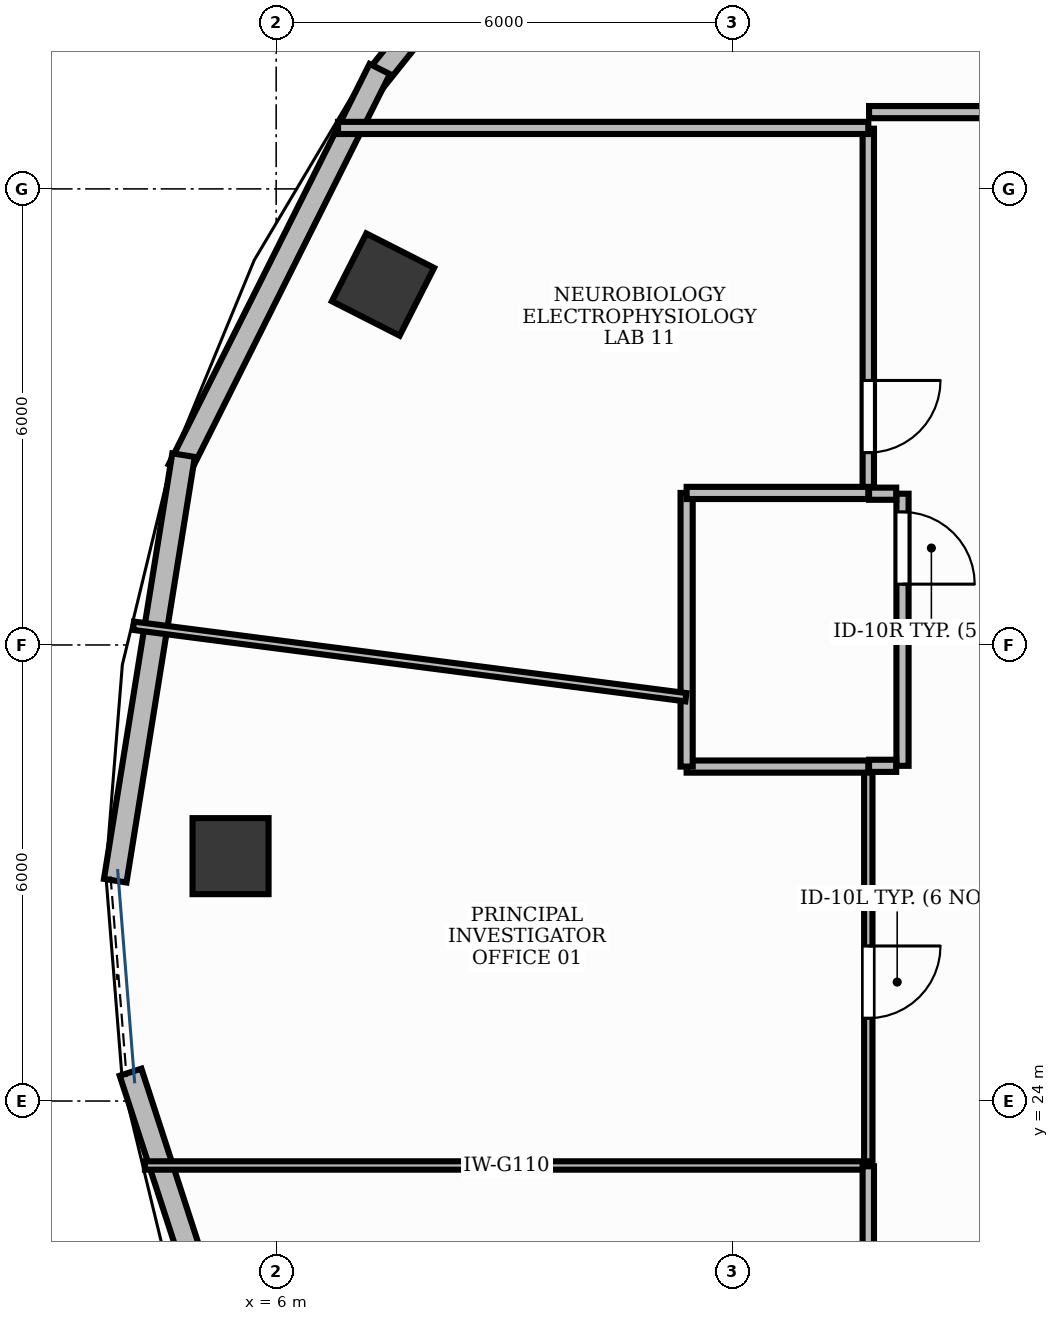
"""IFC4 building model, lengths in metres.
Left out: names, types, materials, properties, quantities, classifications, styles, units other than length and angle.
Written with IfcOpenShell. Run it as: python <this file> out.ifc"""

import sys

from ifc_helpers import new_model, si_unit, direction, frame, frame_2d, origin, origin_2d, place, context, subcontext, project, spatial, rectangle, extrude, element, fill, save


model = new_model("IFC4")
c1 = context("Model", 3, precision=1e-05, world=origin(), true_north=direction((0.0, 1.0)))
c2 = subcontext(c1, "Body", "Model", "MODEL_VIEW")
j1 = project(units=[si_unit("LENGTHUNIT", "METRE"), si_unit("PLANEANGLEUNIT", "RADIAN")], contexts=[c1])
p1 = place(None, origin())
s1 = spatial("IfcSite", under=j1, at=p1, CompositionType="ELEMENT")
p2 = place(p1, origin())
s2 = spatial("IfcBuilding", under=s1, at=p2, CompositionType="ELEMENT")
p3 = place(p2, frame((0.0, 0.0, 218.4)))
s3 = spatial("IfcBuildingStorey", under=s2, at=p3, CompositionType="ELEMENT", Elevation=218.4)
for number, where, z_axis, x_axis in (
    (1, (7.405, 34.741, -0.0), (0.0, 0.0, 1.0), (0.453, 0.891, 0.0)),
    (2, (5.4, 27.222, -0.0), (0.0, 0.0, 1.0), (0.0, 1.0, 0.0)),
):
    element("IfcColumn", number, at=place(p3, frame(where, z_axis=z_axis, x_axis=x_axis)), inside=s3, PredefinedType="COLUMN", context=c2, shape_type="SweptSolid", body=[
        extrude(rectangle(XDim=1.0, YDim=1.0, at=origin_2d()), origin(), (0.0, 0.0, 1.0), 3.901),
    ])
p4 = place(p3, frame((9.244, 39.868, 0.0), z_axis=(0.0, 0.0, 1.0), x_axis=(-0.624095877763, -0.781347768512, 0.0)))
e3 = element("IfcWall", 3, at=p4, inside=s3, PredefinedType="STANDARD", context=c2, shape_type="SweptSolid", body=[
    extrude(rectangle(XDim=3.132, YDim=0.3, at=frame_2d((1.566, 0.0))), origin(), (0.0, 0.0, 1.0), 3.9),
])
p5 = place(p4, frame((0.816, 0.0, 0.95)))
e4 = element("IfcOpeningElement", 4, at=p5, cuts=e3, PredefinedType="OPENING", context=c2, shape_type="SweptSolid", body=[
    extrude(rectangle(XDim=1.5, YDim=1.8, at=frame_2d((0.75, 0.9))), frame((0.0, 0.165, 0.0), z_axis=(0.0, -1.0, 0.0), x_axis=(1.0, 0.0, 0.0)), (0.0, 0.0, 1.0), 0.33),
])
p6 = place(p3, frame((7.363, 37.577, 0.0), z_axis=(0.0, 0.0, 1.0), x_axis=(-0.448240215972, -0.893913143871, 0.0)))
e5 = element("IfcWall", 5, at=p6, inside=s3, PredefinedType="STANDARD", context=c2, shape_type="SweptSolid", body=[
    extrude(rectangle(XDim=5.896, YDim=0.3, at=frame_2d((2.948, 0.0))), origin(), (0.0, 0.0, 1.0), 3.47),
])
p7 = place(p3, frame((4.782, 32.497, 0.0), z_axis=(0.0, 0.0, 1.0), x_axis=(-0.158573166105, -0.987347229191, 0.0)))
e6 = element("IfcWall", 6, at=p7, inside=s3, PredefinedType="STANDARD", context=c2, shape_type="SweptSolid", body=[
    extrude(rectangle(XDim=5.67, YDim=0.3, at=frame_2d((2.835, 0.0))), origin(), (0.0, 0.0, 1.0), 3.47),
])
p8 = place(p3, frame((4.084, 24.379, 0.0), z_axis=(0.0, 0.0, 1.0), x_axis=(0.309937285623, -0.95075700312, 0.0)))
e7 = element("IfcWall", 7, at=p8, inside=s3, PredefinedType="STANDARD", context=c2, shape_type="SweptSolid", body=[
    extrude(rectangle(XDim=5.758, YDim=0.3, at=frame_2d((2.879, 0.0))), origin(), (0.0, 0.0, 1.0), 3.9),
])
p9 = place(p3, frame((14.24, 31.99, 0.0), z_axis=(0.0, 0.0, 1.0), x_axis=(0.0, -1.0, 0.0)))
e8 = element("IfcWall", 8, at=p9, inside=s3, PredefinedType="PARTITIONING", context=c2, shape_type="SweptSolid", body=[
    extrude(rectangle(XDim=3.58, YDim=0.16, at=frame_2d((1.79, 0.0))), origin(), (0.0, 0.0, 1.0), 2.91),
])
p10 = place(p9, frame((0.24, 0.0, 0.0)))
e9 = element("IfcOpeningElement", 9, at=p10, cuts=e8, PredefinedType="OPENING", context=c2, shape_type="SweptSolid", body=[
    extrude(rectangle(XDim=0.95, YDim=2.15, at=frame_2d((0.475, 1.075))), frame((0.0, 0.095, 0.0), z_axis=(0.0, -1.0, 0.0), x_axis=(1.0, 0.0, 0.0)), (0.0, 0.0, 1.0), 0.19),
])
p11 = place(p3, frame((13.79, 28.39, 0.0), z_axis=(0.0, 0.0, 1.0), x_axis=(0.0, -1.0, 0.0)))
e10 = element("IfcWall", 10, at=p11, inside=s3, PredefinedType="MOVABLE", context=c2, shape_type="SweptSolid", body=[
    extrude(rectangle(XDim=5.238, YDim=0.11, at=frame_2d((2.619, 0.0))), origin(), (0.0, 0.0, 1.0), 2.91),
])
p12 = place(p11, frame((2.35, 0.0, 0.0)))
e11 = element("IfcOpeningElement", 11, at=p12, cuts=e10, PredefinedType="OPENING", context=c2, shape_type="SweptSolid", body=[
    extrude(rectangle(XDim=0.95, YDim=2.15, at=frame_2d((0.475, 1.075))), frame((0.0, 0.07, 0.0), z_axis=(0.0, -1.0, 0.0), x_axis=(1.0, 0.0, 0.0)), (0.0, 0.0, 1.0), 0.14),
])
p13 = place(p3, frame((13.79, 36.792, 0.0), z_axis=(0.0, 0.0, 1.0), x_axis=(0.0, -1.0, 0.0)))
e12 = element("IfcWall", 12, at=p13, inside=s3, PredefinedType="PARTITIONING", context=c2, shape_type="SweptSolid", body=[
    extrude(rectangle(XDim=4.782, YDim=0.15, at=frame_2d((2.391, 0.0))), origin(), (0.0, 0.0, 1.0), 2.91),
])
p14 = place(p13, frame((3.312, 0.0, 0.0)))
e13 = element("IfcOpeningElement", 13, at=p14, cuts=e12, PredefinedType="OPENING", context=c2, shape_type="SweptSolid", body=[
    extrude(rectangle(XDim=0.95, YDim=2.15, at=frame_2d((0.475, 1.075))), frame((0.0, 0.09, 0.0), z_axis=(0.0, -1.0, 0.0), x_axis=(1.0, 0.0, 0.0)), (0.0, 0.0, 1.0), 0.18),
])
for number, where, z_axis, x_axis in (
    (14, (13.8, 31.99, 0.0), (0.0, 0.0, 1.0), (1.0, 0.0, 0.0)),
    (15, (14.157, 28.41, 0.0), (0.0, 0.0, 1.0), (-1.0, 0.0, 0.0)),
):
    element("IfcWall", number, at=place(p3, frame(where, z_axis=z_axis, x_axis=x_axis)), inside=s3, PredefinedType="PARTITIONING", context=c2, shape_type="SweptSolid", body=[
        extrude(rectangle(XDim=0.357, YDim=0.16, at=frame_2d((0.178, 0.0))), origin(), (0.0, 0.0, 1.0), 2.91),
    ])
p15 = place(p3, frame((13.79, 28.4, 0.0), z_axis=(0.0, 0.0, 1.0), x_axis=(-1.0, 0.0, 0.0)))
e16 = element("IfcWall", 16, at=p15, inside=s3, PredefinedType="PARTITIONING", context=c2, shape_type="SweptSolid", body=[
    extrude(rectangle(XDim=2.39, YDim=0.16, at=frame_2d((1.195, 0.0))), origin(), (0.0, 0.0, 1.0), 2.91),
])
p16 = place(p3, frame((11.4, 28.4, 0.0), z_axis=(0.0, 0.0, 1.0), x_axis=(0.0, 1.0, 0.0)))
e17 = element("IfcWall", 17, at=p16, inside=s3, PredefinedType="PARTITIONING", context=c2, shape_type="SweptSolid", body=[
    extrude(rectangle(XDim=3.6, YDim=0.16, at=frame_2d((1.8, 0.0))), origin(), (0.0, 0.0, 1.0), 2.91),
])
p17 = place(p3, frame((11.4, 32.0, 0.0), z_axis=(0.0, 0.0, 1.0), x_axis=(1.0, 0.0, 0.0)))
e18 = element("IfcWall", 18, at=p17, inside=s3, PredefinedType="PARTITIONING", context=c2, shape_type="SweptSolid", body=[
    extrude(rectangle(XDim=2.39, YDim=0.16, at=frame_2d((1.195, 0.0))), origin(), (0.0, 0.0, 1.0), 2.91),
])
p18 = place(p3, frame((4.123, 30.253, 0.0), z_axis=(0.0, 0.0, 1.0), x_axis=(0.991734568624, -0.128306451111, 0.0)))
e19 = element("IfcWall", 19, at=p18, inside=s3, PredefinedType="MOVABLE", context=c2, shape_type="SweptSolid", body=[
    extrude(rectangle(XDim=7.328, YDim=0.11, at=frame_2d((3.664, 0.0))), origin(), (0.0, 0.0, 1.0), 2.91),
])
p19 = place(p3, frame((13.79, 23.152, 0.0), z_axis=(0.0, 0.0, 1.0), x_axis=(-1.0, 0.0, 0.0)))
e20 = element("IfcWall", 20, at=p19, inside=s3, PredefinedType="MOVABLE", context=c2, shape_type="SweptSolid", body=[
    extrude(rectangle(XDim=9.517, YDim=0.11, at=frame_2d((4.758, 0.0))), origin(), (0.0, 0.0, 1.0), 2.91),
])
p20 = place(p3, frame((13.79, 23.142, 0.0), z_axis=(0.0, 0.0, 1.0), x_axis=(0.0, -1.0, 0.0)))
e21 = element("IfcWall", 21, at=p20, inside=s3, PredefinedType="PARTITIONING", context=c2, shape_type="SweptSolid", body=[
    extrude(rectangle(XDim=10.046, YDim=0.15, at=frame_2d((5.023, 0.0))), origin(), (0.0, 0.0, 1.0), 2.91),
])
p21 = place(p3, frame((17.6, 37.01, 0.0), z_axis=(0.0, 0.0, 1.0), x_axis=(-1.0, 0.0, 0.0)))
e22 = element("IfcWall", 22, at=p21, inside=s3, PredefinedType="PARTITIONING", context=c2, shape_type="SweptSolid", body=[
    extrude(rectangle(XDim=3.8, YDim=0.16, at=frame_2d((1.9, 0.0))), origin(), (0.0, 0.0, 1.0), 2.91),
])
p22 = place(p3, frame((13.79, 36.802, 0.0), z_axis=(0.0, 0.0, 1.0), x_axis=(-1.0, 0.0, 0.0)))
e23 = element("IfcWall", 23, at=p22, inside=s3, PredefinedType="PARTITIONING", context=c2, shape_type="SweptSolid", body=[
    extrude(rectangle(XDim=6.976, YDim=0.16, at=frame_2d((3.488, 0.0))), origin(), (0.0, 0.0, 1.0), 2.91),
])
p23 = place(p10, origin())
e24 = element("IfcDoor", 24, at=p23, inside=s3, OperationType="SINGLE_SWING_RIGHT", PredefinedType="DOOR", context=c2, shape_type="SweptSolid", body=[
    extrude(rectangle(XDim=0.95, YDim=2.15, at=frame_2d((0.475, 1.075))), frame((0.0, 0.025, 0.0), z_axis=(0.0, -1.0, 0.0), x_axis=(1.0, 0.0, 0.0)), (0.0, 0.0, 1.0), 0.05),
])
fill(e9, e24)
p24 = place(p12, origin())
e25 = element("IfcDoor", 25, at=p24, inside=s3, OperationType="SINGLE_SWING_LEFT", PredefinedType="DOOR", context=c2, shape_type="SweptSolid", body=[
    extrude(rectangle(XDim=0.95, YDim=2.15, at=frame_2d((0.475, 1.075))), frame((0.0, 0.025, 0.0), z_axis=(0.0, -1.0, 0.0), x_axis=(1.0, 0.0, 0.0)), (0.0, 0.0, 1.0), 0.05),
])
fill(e11, e25)
p25 = place(p14, origin())
e26 = element("IfcDoor", 26, at=p25, inside=s3, OperationType="SINGLE_SWING_LEFT", PredefinedType="DOOR", context=c2, shape_type="SweptSolid", body=[
    extrude(rectangle(XDim=0.95, YDim=2.15, at=frame_2d((0.475, 1.075))), frame((0.0, 0.025, 0.0), z_axis=(0.0, -1.0, 0.0), x_axis=(1.0, 0.0, 0.0)), (0.0, 0.0, 1.0), 0.05),
])
fill(e13, e26)
save(model, sys.argv[1])
